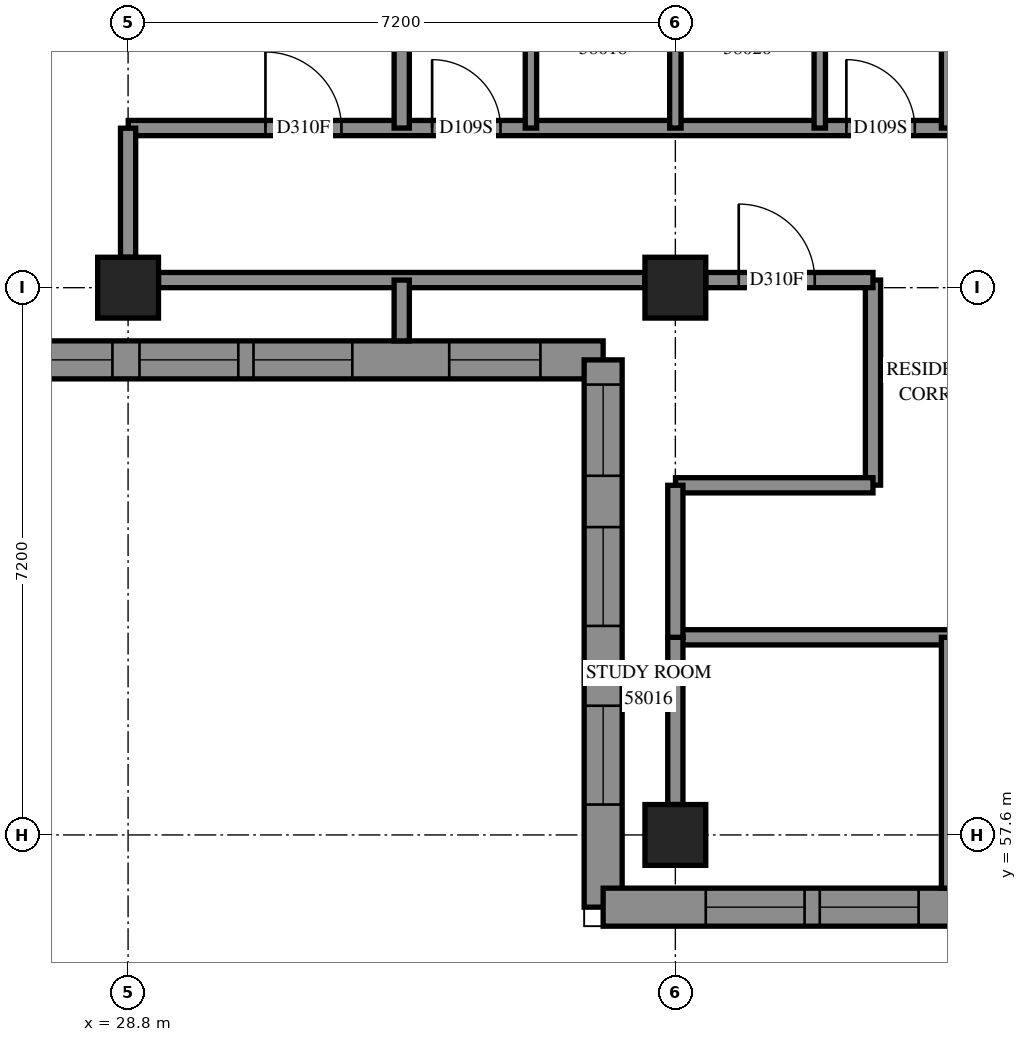
"""IFC4 building model, lengths in metres.
Left out: names, types, materials, properties, quantities, classifications, styles, units other than length and angle.
Written with IfcOpenShell. Run it as: python <this file> out.ifc"""

import sys

from ifc_helpers import new_model, si_unit, direction, frame, frame_2d, origin, origin_2d, place, context, subcontext, project, spatial, polyline, rectangle, outline, extrude, element, fill, save


model = new_model("IFC4")
c1 = context("Model", 3, precision=1e-05, world=origin(), true_north=direction((0.0, 1.0)))
c2 = subcontext(c1, "Body", "Model", "MODEL_VIEW")
j1 = project(units=[si_unit("LENGTHUNIT", "METRE"), si_unit("PLANEANGLEUNIT", "RADIAN")], contexts=[c1])
p1 = place(None, origin())
s1 = spatial("IfcSite", under=j1, at=p1, CompositionType="ELEMENT")
p2 = place(p1, origin())
s2 = spatial("IfcBuilding", under=s1, at=p2, CompositionType="ELEMENT")
p3 = place(p2, frame((0.0, 0.0, 213.4)))
s3 = spatial("IfcBuildingStorey", under=s2, at=p3, CompositionType="ELEMENT", Elevation=213.4)
for number, where, z_axis, x_axis in (
    (1, (28.8, 64.8, 0.0), (0.0, 0.0, 1.0), (1.0, 0.0, 0.0)),
    (2, (36.0, 57.6, 0.0), (0.0, 0.0, 1.0), (1.0, 0.0, 0.0)),
    (3, (36.0, 64.8, 0.0), (0.0, 0.0, 1.0), (1.0, 0.0, 0.0)),
):
    element("IfcColumn", number, at=place(p3, frame(where, z_axis=z_axis, x_axis=x_axis)), inside=s3, PredefinedType="COLUMN", context=c2, shape_type="SweptSolid", body=[
        extrude(rectangle(XDim=0.8, YDim=0.8, at=origin_2d()), origin(), (0.0, 0.0, 1.0), 3.1),
    ])
p4 = place(p3, frame((26.738, 63.85, 0.0), z_axis=(0.0, 0.0, 1.0), x_axis=(1.0, 0.0, 0.0)))
e4 = element("IfcWall", 4, at=p4, inside=s3, PredefinedType="SOLIDWALL", context=c2, shape_type="SweptSolid", body=[
    extrude(outline(polyline([(-0.25, -0.25), (8.062, -0.25), (8.562, 0.25), (0.25, 0.25), (-0.25, -0.25)])), origin(), (0.0, 0.0, 1.0), 3.1),
])
p5 = place(p4, frame((2.212, 0.0, 0.45)))
e5 = element("IfcOpeningElement", 5, at=p5, cuts=e4, PredefinedType="OPENING", context=c2, shape_type="SweptSolid", body=[
    extrude(rectangle(XDim=1.3, YDim=2.5, at=frame_2d((0.65, 1.25))), frame((0.0, 0.26, 0.0), z_axis=(0.0, -1.0, 0.0), x_axis=(1.0, 0.0, 0.0)), (0.0, 0.0, 1.0), 0.52),
])
p6 = place(p4, frame((3.712, 0.0, 0.45)))
e6 = element("IfcOpeningElement", 6, at=p6, cuts=e4, PredefinedType="OPENING", context=c2, shape_type="SweptSolid", body=[
    extrude(rectangle(XDim=1.3, YDim=2.5, at=frame_2d((0.65, 1.25))), frame((0.0, 0.26, 0.0), z_axis=(0.0, -1.0, 0.0), x_axis=(1.0, 0.0, 0.0)), (0.0, 0.0, 1.0), 0.52),
])
p7 = place(p4, frame((0.656, 0.0, 0.45)))
e7 = element("IfcOpeningElement", 7, at=p7, cuts=e4, PredefinedType="OPENING", context=c2, shape_type="SweptSolid", body=[
    extrude(rectangle(XDim=1.2, YDim=2.5, at=frame_2d((0.6, 1.25))), frame((0.0, 0.26, 0.0), z_axis=(0.0, -1.0, 0.0), x_axis=(1.0, 0.0, 0.0)), (0.0, 0.0, 1.0), 0.52),
])
p8 = place(p4, frame((6.287, 0.0, 0.45)))
e8 = element("IfcOpeningElement", 8, at=p8, cuts=e4, PredefinedType="OPENING", context=c2, shape_type="SweptSolid", body=[
    extrude(rectangle(XDim=1.2, YDim=2.5, at=frame_2d((0.6, 1.25))), frame((0.0, 0.26, 0.0), z_axis=(0.0, -1.0, 0.0), x_axis=(1.0, 0.0, 0.0)), (0.0, 0.0, 1.0), 0.52),
])
p9 = place(p3, frame((35.05, 63.85, 0.0), z_axis=(0.0, 0.0, 1.0), x_axis=(0.0, -1.0, 0.0)))
e9 = element("IfcWall", 9, at=p9, inside=s3, PredefinedType="SOLIDWALL", context=c2, shape_type="SweptSolid", body=[
    extrude(outline(polyline([(0.25, -0.25), (7.45, -0.25), (6.95, 0.25), (-0.25, 0.25), (0.25, -0.25)])), origin(), (0.0, 0.0, 1.0), 3.1),
])
p10 = place(p9, frame((2.2, 0.0, 0.45)))
e10 = element("IfcOpeningElement", 10, at=p10, cuts=e9, PredefinedType="OPENING", context=c2, shape_type="SweptSolid", body=[
    extrude(rectangle(XDim=1.3, YDim=2.5, at=frame_2d((0.65, 1.25))), frame((0.0, 0.26, 0.0), z_axis=(0.0, -1.0, 0.0), x_axis=(1.0, 0.0, 0.0)), (0.0, 0.0, 1.0), 0.52),
])
p11 = place(p9, frame((4.55, 0.0, 0.45)))
e11 = element("IfcOpeningElement", 11, at=p11, cuts=e9, PredefinedType="OPENING", context=c2, shape_type="SweptSolid", body=[
    extrude(rectangle(XDim=1.3, YDim=2.5, at=frame_2d((0.65, 1.25))), frame((0.0, 0.26, 0.0), z_axis=(0.0, -1.0, 0.0), x_axis=(1.0, 0.0, 0.0)), (0.0, 0.0, 1.0), 0.52),
])
p12 = place(p9, frame((0.325, 0.0, 0.45)))
e12 = element("IfcOpeningElement", 12, at=p12, cuts=e9, PredefinedType="OPENING", context=c2, shape_type="SweptSolid", body=[
    extrude(rectangle(XDim=1.2, YDim=2.5, at=frame_2d((0.6, 1.25))), frame((0.0, 0.26, 0.0), z_axis=(0.0, -1.0, 0.0), x_axis=(1.0, 0.0, 0.0)), (0.0, 0.0, 1.0), 0.52),
])
p13 = place(p3, frame((35.05, 56.65, 0.0), z_axis=(0.0, 0.0, 1.0), x_axis=(1.0, 0.0, 0.0)))
e13 = element("IfcWall", 13, at=p13, inside=s3, PredefinedType="SOLIDWALL", context=c2, shape_type="SweptSolid", body=[
    extrude(outline(polyline([(-0.25, -0.25), (6.95, -0.25), (7.45, 0.25), (0.25, 0.25), (-0.25, -0.25)])), origin(), (0.0, 0.0, 1.0), 3.1),
])
p14 = place(p13, frame((1.35, 0.0, 0.45)))
e14 = element("IfcOpeningElement", 14, at=p14, cuts=e13, PredefinedType="OPENING", context=c2, shape_type="SweptSolid", body=[
    extrude(rectangle(XDim=1.3, YDim=2.5, at=frame_2d((0.65, 1.25))), frame((0.0, 0.26, 0.0), z_axis=(0.0, -1.0, 0.0), x_axis=(1.0, 0.0, 0.0)), (0.0, 0.0, 1.0), 0.52),
])
p15 = place(p13, frame((2.85, 0.0, 0.45)))
e15 = element("IfcOpeningElement", 15, at=p15, cuts=e13, PredefinedType="OPENING", context=c2, shape_type="SweptSolid", body=[
    extrude(rectangle(XDim=1.3, YDim=2.5, at=frame_2d((0.65, 1.25))), frame((0.0, 0.26, 0.0), z_axis=(0.0, -1.0, 0.0), x_axis=(1.0, 0.0, 0.0)), (0.0, 0.0, 1.0), 0.52),
])
p16 = place(p13, frame((5.175, 0.0, 0.45)))
e16 = element("IfcOpeningElement", 16, at=p16, cuts=e13, PredefinedType="OPENING", context=c2, shape_type="SweptSolid", body=[
    extrude(rectangle(XDim=1.2, YDim=2.5, at=frame_2d((0.6, 1.25))), frame((0.0, 0.26, 0.0), z_axis=(0.0, -1.0, 0.0), x_axis=(1.0, 0.0, 0.0)), (0.0, 0.0, 1.0), 0.52),
])
p17 = place(p3, frame((36.0, 60.2, 0.0), z_axis=(0.0, 0.0, 1.0), x_axis=(1.0, 0.0, 0.0)))
e17 = element("IfcWall", 17, at=p17, inside=s3, PredefinedType="PARTITIONING", context=c2, shape_type="SweptSolid", body=[
    extrude(rectangle(XDim=17.0, YDim=0.2, at=frame_2d((8.5, 0.0))), origin(), (0.0, 0.0, 1.0), 3.1),
])
p18 = place(p17, frame((4.125, 0.0, 0.0)))
e18 = element("IfcOpeningElement", 18, at=p18, cuts=e17, PredefinedType="OPENING", context=c2, shape_type="SweptSolid", body=[
    extrude(rectangle(XDim=1.0, YDim=2.1, at=frame_2d((0.5, 1.05))), frame((0.0, 0.11, 0.0), z_axis=(0.0, -1.0, 0.0), x_axis=(1.0, 0.0, 0.0)), (0.0, 0.0, 1.0), 0.22),
])
p19 = place(p17, frame((7.6, 0.0, 0.0)))
e19 = element("IfcOpeningElement", 19, at=p19, cuts=e17, PredefinedType="OPENING", context=c2, shape_type="SweptSolid", body=[
    extrude(rectangle(XDim=0.9, YDim=2.1, at=frame_2d((0.45, 1.05))), frame((0.0, 0.11, 0.0), z_axis=(0.0, -1.0, 0.0), x_axis=(1.0, 0.0, 0.0)), (0.0, 0.0, 1.0), 0.22),
])
p20 = place(p17, frame((11.48, 0.0, 0.0)))
e20 = element("IfcOpeningElement", 20, at=p20, cuts=e17, PredefinedType="OPENING", context=c2, shape_type="SweptSolid", body=[
    extrude(rectangle(XDim=1.0, YDim=2.1, at=frame_2d((0.5, 1.05))), frame((0.0, 0.11, 0.0), z_axis=(0.0, -1.0, 0.0), x_axis=(1.0, 0.0, 0.0)), (0.0, 0.0, 1.0), 0.22),
])
p21 = place(p17, frame((15.805, 0.0, 0.0)))
e21 = element("IfcOpeningElement", 21, at=p21, cuts=e17, PredefinedType="OPENING", context=c2, shape_type="SweptSolid", body=[
    extrude(rectangle(XDim=1.0, YDim=2.1, at=frame_2d((0.5, 1.05))), frame((0.0, 0.11, 0.0), z_axis=(0.0, -1.0, 0.0), x_axis=(1.0, 0.0, 0.0)), (0.0, 0.0, 1.0), 0.22),
])
p22 = place(p3, frame((28.802, 66.9, 0.0), z_axis=(0.0, 0.0, 1.0), x_axis=(1.0, 0.0, 0.0)))
e22 = element("IfcWall", 22, at=p22, inside=s3, PredefinedType="PARTITIONING", context=c2, shape_type="SweptSolid", body=[
    extrude(rectangle(XDim=11.798, YDim=0.2, at=frame_2d((5.899, 0.0))), origin(), (0.0, 0.0, 1.0), 3.1),
])
p23 = place(p22, frame((1.805, 0.0, 0.0)))
e23 = element("IfcOpeningElement", 23, at=p23, cuts=e22, PredefinedType="OPENING", context=c2, shape_type="SweptSolid", body=[
    extrude(rectangle(XDim=1.0, YDim=2.1, at=frame_2d((0.5, 1.05))), frame((0.0, 0.11, 0.0), z_axis=(0.0, -1.0, 0.0), x_axis=(1.0, 0.0, 0.0)), (0.0, 0.0, 1.0), 0.22),
])
p24 = place(p22, frame((3.998, 0.0, 0.0)))
e24 = element("IfcOpeningElement", 24, at=p24, cuts=e22, PredefinedType="OPENING", context=c2, shape_type="SweptSolid", body=[
    extrude(rectangle(XDim=0.9, YDim=2.1, at=frame_2d((0.45, 1.05))), frame((0.0, 0.11, 0.0), z_axis=(0.0, -1.0, 0.0), x_axis=(1.0, 0.0, 0.0)), (0.0, 0.0, 1.0), 0.22),
])
p25 = place(p22, frame((9.448, 0.0, 0.0)))
e25 = element("IfcOpeningElement", 25, at=p25, cuts=e22, PredefinedType="OPENING", context=c2, shape_type="SweptSolid", body=[
    extrude(rectangle(XDim=0.9, YDim=2.1, at=frame_2d((0.45, 1.05))), frame((0.0, 0.11, 0.0), z_axis=(0.0, -1.0, 0.0), x_axis=(1.0, 0.0, 0.0)), (0.0, 0.0, 1.0), 0.22),
])
p26 = place(p3, frame((29.2, 64.9, 0.0), z_axis=(0.0, 0.0, 1.0), x_axis=(1.0, 0.0, 0.0)))
e26 = element("IfcWall", 26, at=p26, inside=s3, PredefinedType="PARTITIONING", context=c2, shape_type="SweptSolid", body=[
    extrude(rectangle(XDim=6.4, YDim=0.2, at=frame_2d((3.2, 0.0))), origin(), (0.0, 0.0, 1.0), 2.6),
])
p27 = place(p3, frame((32.4, 66.9, 0.0), z_axis=(0.0, 0.0, 1.0), x_axis=(0.0, 1.0, 0.0)))
e27 = element("IfcWall", 27, at=p27, inside=s3, PredefinedType="PARTITIONING", context=c2, shape_type="SweptSolid", body=[
    extrude(rectangle(XDim=6.073, YDim=0.2, at=frame_2d((3.037, 0.0))), origin(), (0.0, 0.0, 1.0), 3.1),
])
p28 = place(p3, frame((39.6, 66.9, 0.0), z_axis=(0.0, 0.0, 1.0), x_axis=(0.0, 1.0, 0.0)))
e28 = element("IfcWall", 28, at=p28, inside=s3, PredefinedType="PARTITIONING", context=c2, shape_type="SweptSolid", body=[
    extrude(rectangle(XDim=6.011, YDim=0.2, at=frame_2d((3.005, 0.0))), origin(), (0.0, 0.0, 1.0), 3.1),
])
p29 = place(p3, frame((39.6, 56.9, 0.0), z_axis=(0.0, 0.0, 1.0), x_axis=(0.0, 1.0, 0.0)))
e29 = element("IfcWall", 29, at=p29, inside=s3, PredefinedType="PARTITIONING", context=c2, shape_type="SweptSolid", body=[
    extrude(rectangle(XDim=3.3, YDim=0.2, at=frame_2d((1.65, 0.0))), origin(), (0.0, 0.0, 1.0), 3.1),
])
p30 = place(p3, frame((38.6, 62.202, 0.0), z_axis=(0.0, 0.0, 1.0), x_axis=(0.0, 1.0, 0.0)))
e30 = element("IfcWall", 30, at=p30, inside=s3, PredefinedType="PARTITIONING", context=c2, shape_type="SweptSolid", body=[
    extrude(rectangle(XDim=2.698, YDim=0.2, at=frame_2d((1.349, 0.0))), origin(), (0.0, 0.0, 1.0), 3.1),
])
p31 = place(p3, frame((36.002, 62.2, 0.0), z_axis=(0.0, 0.0, 1.0), x_axis=(1.0, 0.0, 0.0)))
e31 = element("IfcWall", 31, at=p31, inside=s3, PredefinedType="PARTITIONING", context=c2, shape_type="SweptSolid", body=[
    extrude(rectangle(XDim=2.598, YDim=0.2, at=frame_2d((1.299, 0.0))), origin(), (0.0, 0.0, 1.0), 3.1),
])
for number, where, z_axis, x_axis in (
    (32, (34.1, 66.9, 0.0), (0.0, 0.0, 1.0), (0.0, 1.0, 0.0)),
    (33, (36.0, 66.9, 0.0), (0.0, 0.0, 1.0), (0.0, 1.0, 0.0)),
    (34, (37.9, 66.9, 0.0), (0.0, 0.0, 1.0), (0.0, 1.0, 0.0)),
):
    element("IfcWall", number, at=place(p3, frame(where, z_axis=z_axis, x_axis=x_axis)), inside=s3, PredefinedType="PARTITIONING", context=c2, shape_type="SweptSolid", body=[
        extrude(rectangle(XDim=2.4, YDim=0.15, at=frame_2d((1.2, 0.0))), origin(), (0.0, 0.0, 1.0), 3.1),
    ])
p32 = place(p3, frame((36.4, 64.9, 0.0), z_axis=(0.0, 0.0, 1.0), x_axis=(1.0, 0.0, 0.0)))
e35 = element("IfcWall", 35, at=p32, inside=s3, PredefinedType="PARTITIONING", context=c2, shape_type="SweptSolid", body=[
    extrude(rectangle(XDim=2.2, YDim=0.2, at=frame_2d((1.1, 0.0))), origin(), (0.0, 0.0, 1.0), 3.1),
])
p33 = place(p32, frame((0.434, 0.0, 0.0)))
e36 = element("IfcOpeningElement", 36, at=p33, cuts=e35, PredefinedType="OPENING", context=c2, shape_type="SweptSolid", body=[
    extrude(rectangle(XDim=1.0, YDim=2.1, at=frame_2d((0.5, 1.05))), frame((0.0, 0.11, 0.0), z_axis=(0.0, -1.0, 0.0), x_axis=(1.0, 0.0, 0.0)), (0.0, 0.0, 1.0), 0.22),
])
p34 = place(p3, frame((36.0, 58.0, 0.0), z_axis=(0.0, 0.0, 1.0), x_axis=(0.0, 1.0, 0.0)))
e37 = element("IfcWall", 37, at=p34, inside=s3, PredefinedType="PARTITIONING", context=c2, shape_type="SweptSolid", body=[
    extrude(rectangle(XDim=2.2, YDim=0.2, at=frame_2d((1.1, 0.0))), origin(), (0.0, 0.0, 1.0), 2.6),
])
p35 = place(p3, frame((36.0, 60.2, 0.0), z_axis=(0.0, 0.0, 1.0), x_axis=(0.0, 1.0, 0.0)))
e38 = element("IfcWall", 38, at=p35, inside=s3, PredefinedType="PARTITIONING", context=c2, shape_type="SweptSolid", body=[
    extrude(rectangle(XDim=2.0, YDim=0.2, at=frame_2d((1.0, 0.0))), origin(), (0.0, 0.0, 1.0), 2.6),
])
p36 = place(p3, frame((28.8, 65.2, 0.0), z_axis=(0.0, 0.0, 1.0), x_axis=(0.0, 1.0, 0.0)))
e39 = element("IfcWall", 39, at=p36, inside=s3, PredefinedType="PARTITIONING", context=c2, shape_type="SweptSolid", body=[
    extrude(rectangle(XDim=1.698, YDim=0.2, at=frame_2d((0.849, 0.0))), origin(), (0.0, 0.0, 1.0), 2.6),
])
p37 = place(p3, frame((32.4, 64.1, 0.0), z_axis=(0.0, 0.0, 1.0), x_axis=(0.0, 1.0, 0.0)))
e40 = element("IfcWall", 40, at=p37, inside=s3, PredefinedType="PARTITIONING", context=c2, shape_type="SweptSolid", body=[
    extrude(rectangle(XDim=0.8, YDim=0.2, at=frame_2d((0.4, 0.0))), origin(), (0.0, 0.0, 1.0), 3.1),
])
p38 = place(p5, origin())
e41 = element("IfcWindow", 41, at=p38, inside=s3, PartitioningType="SINGLE_PANEL", PredefinedType="WINDOW", context=c2, shape_type="SweptSolid", body=[
    extrude(rectangle(XDim=1.3, YDim=2.5, at=frame_2d((0.65, 1.25))), frame((0.0, 0.18, 0.0), z_axis=(0.0, -1.0, 0.0), x_axis=(1.0, 0.0, 0.0)), (0.0, 0.0, 1.0), 0.06),
])
fill(e5, e41)
p39 = place(p6, origin())
e42 = element("IfcWindow", 42, at=p39, inside=s3, PartitioningType="SINGLE_PANEL", PredefinedType="WINDOW", context=c2, shape_type="SweptSolid", body=[
    extrude(rectangle(XDim=1.3, YDim=2.5, at=frame_2d((0.65, 1.25))), frame((0.0, 0.18, 0.0), z_axis=(0.0, -1.0, 0.0), x_axis=(1.0, 0.0, 0.0)), (0.0, 0.0, 1.0), 0.06),
])
fill(e6, e42)
p40 = place(p7, origin())
e43 = element("IfcWindow", 43, at=p40, inside=s3, PartitioningType="SINGLE_PANEL", PredefinedType="WINDOW", context=c2, shape_type="SweptSolid", body=[
    extrude(rectangle(XDim=1.2, YDim=2.5, at=frame_2d((0.6, 1.25))), frame((0.0, 0.18, 0.0), z_axis=(0.0, -1.0, 0.0), x_axis=(1.0, 0.0, 0.0)), (0.0, 0.0, 1.0), 0.06),
])
fill(e7, e43)
p41 = place(p8, origin())
e44 = element("IfcWindow", 44, at=p41, inside=s3, PartitioningType="SINGLE_PANEL", PredefinedType="WINDOW", context=c2, shape_type="SweptSolid", body=[
    extrude(rectangle(XDim=1.2, YDim=2.5, at=frame_2d((0.6, 1.25))), frame((0.0, 0.18, 0.0), z_axis=(0.0, -1.0, 0.0), x_axis=(1.0, 0.0, 0.0)), (0.0, 0.0, 1.0), 0.06),
])
fill(e8, e44)
p42 = place(p10, origin())
e45 = element("IfcWindow", 45, at=p42, inside=s3, PartitioningType="SINGLE_PANEL", PredefinedType="WINDOW", context=c2, shape_type="SweptSolid", body=[
    extrude(rectangle(XDim=1.3, YDim=2.5, at=frame_2d((0.65, 1.25))), frame((0.0, 0.18, 0.0), z_axis=(0.0, -1.0, 0.0), x_axis=(1.0, 0.0, 0.0)), (0.0, 0.0, 1.0), 0.06),
])
fill(e10, e45)
p43 = place(p11, origin())
e46 = element("IfcWindow", 46, at=p43, inside=s3, PartitioningType="SINGLE_PANEL", PredefinedType="WINDOW", context=c2, shape_type="SweptSolid", body=[
    extrude(rectangle(XDim=1.3, YDim=2.5, at=frame_2d((0.65, 1.25))), frame((0.0, 0.18, 0.0), z_axis=(0.0, -1.0, 0.0), x_axis=(1.0, 0.0, 0.0)), (0.0, 0.0, 1.0), 0.06),
])
fill(e11, e46)
p44 = place(p12, origin())
e47 = element("IfcWindow", 47, at=p44, inside=s3, PartitioningType="SINGLE_PANEL", PredefinedType="WINDOW", context=c2, shape_type="SweptSolid", body=[
    extrude(rectangle(XDim=1.2, YDim=2.5, at=frame_2d((0.6, 1.25))), frame((0.0, 0.18, 0.0), z_axis=(0.0, -1.0, 0.0), x_axis=(1.0, 0.0, 0.0)), (0.0, 0.0, 1.0), 0.06),
])
fill(e12, e47)
p45 = place(p14, origin())
e48 = element("IfcWindow", 48, at=p45, inside=s3, PartitioningType="SINGLE_PANEL", PredefinedType="WINDOW", context=c2, shape_type="SweptSolid", body=[
    extrude(rectangle(XDim=1.3, YDim=2.5, at=frame_2d((0.65, 1.25))), frame((0.0, 0.18, 0.0), z_axis=(0.0, -1.0, 0.0), x_axis=(1.0, 0.0, 0.0)), (0.0, 0.0, 1.0), 0.06),
])
fill(e14, e48)
p46 = place(p15, origin())
e49 = element("IfcWindow", 49, at=p46, inside=s3, PartitioningType="SINGLE_PANEL", PredefinedType="WINDOW", context=c2, shape_type="SweptSolid", body=[
    extrude(rectangle(XDim=1.3, YDim=2.5, at=frame_2d((0.65, 1.25))), frame((0.0, 0.18, 0.0), z_axis=(0.0, -1.0, 0.0), x_axis=(1.0, 0.0, 0.0)), (0.0, 0.0, 1.0), 0.06),
])
fill(e15, e49)
p47 = place(p23, origin())
e50 = element("IfcDoor", 50, at=p47, inside=s3, OperationType="SINGLE_SWING_RIGHT", PredefinedType="DOOR", context=c2, shape_type="SweptSolid", body=[
    extrude(rectangle(XDim=1.0, YDim=2.1, at=frame_2d((0.5, 1.05))), frame((0.0, 0.025, 0.0), z_axis=(0.0, -1.0, 0.0), x_axis=(1.0, 0.0, 0.0)), (0.0, 0.0, 1.0), 0.05),
])
fill(e23, e50)
p48 = place(p33, origin())
e51 = element("IfcDoor", 51, at=p48, inside=s3, OperationType="SINGLE_SWING_RIGHT", PredefinedType="DOOR", context=c2, shape_type="SweptSolid", body=[
    extrude(rectangle(XDim=1.0, YDim=2.1, at=frame_2d((0.5, 1.05))), frame((0.0, 0.025, 0.0), z_axis=(0.0, -1.0, 0.0), x_axis=(1.0, 0.0, 0.0)), (0.0, 0.0, 1.0), 0.05),
])
fill(e36, e51)
p49 = place(p24, origin())
e52 = element("IfcDoor", 52, at=p49, inside=s3, OperationType="SINGLE_SWING_LEFT", PredefinedType="DOOR", context=c2, shape_type="SweptSolid", body=[
    extrude(rectangle(XDim=0.9, YDim=2.1, at=frame_2d((0.45, 1.05))), frame((0.0, 0.025, 0.0), z_axis=(0.0, -1.0, 0.0), x_axis=(1.0, 0.0, 0.0)), (0.0, 0.0, 1.0), 0.05),
])
fill(e24, e52)
p50 = place(p25, origin())
e53 = element("IfcDoor", 53, at=p50, inside=s3, OperationType="SINGLE_SWING_RIGHT", PredefinedType="DOOR", context=c2, shape_type="SweptSolid", body=[
    extrude(rectangle(XDim=0.9, YDim=2.1, at=frame_2d((0.45, 1.05))), frame((0.0, 0.025, 0.0), z_axis=(0.0, -1.0, 0.0), x_axis=(1.0, 0.0, 0.0)), (0.0, 0.0, 1.0), 0.05),
])
fill(e25, e53)
save(model, sys.argv[1])
